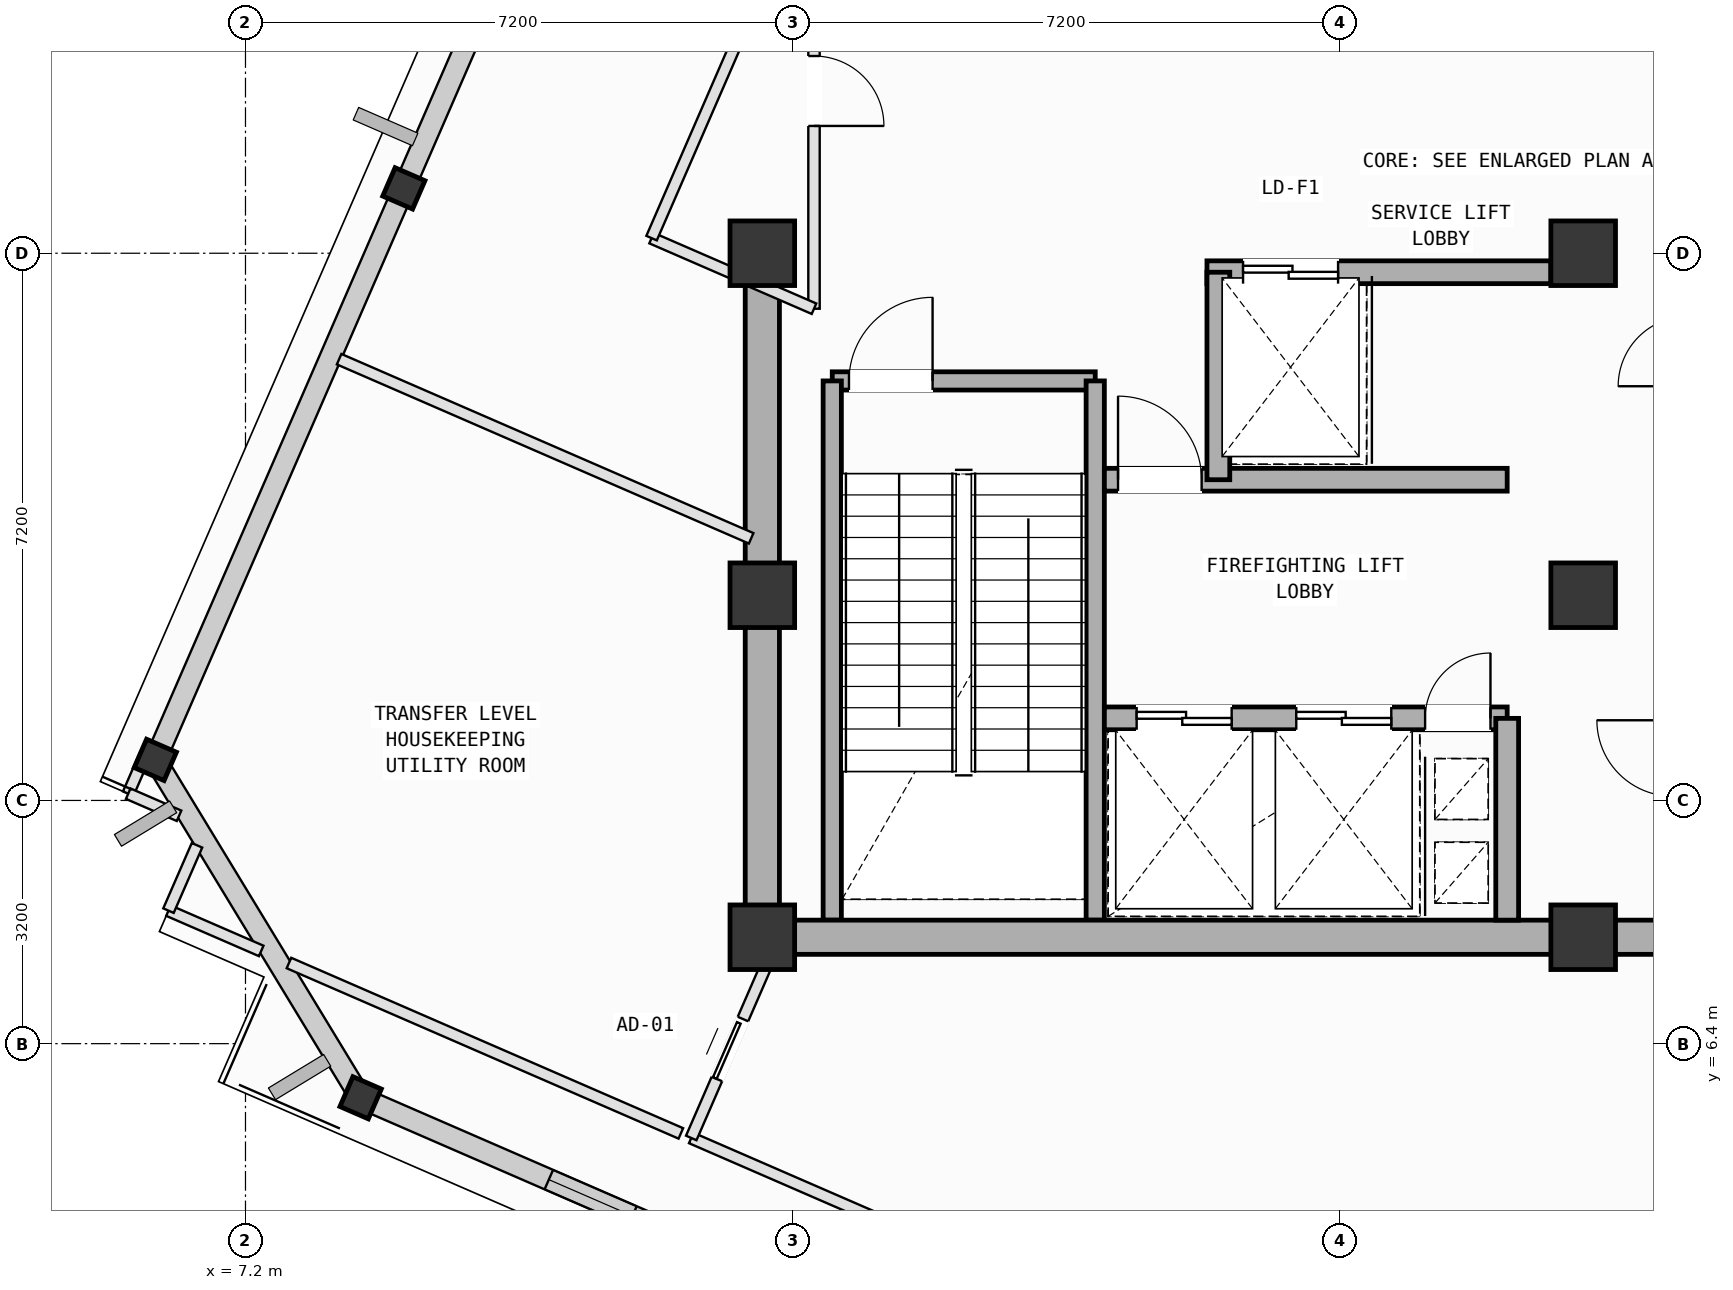
"""IFC4 building model, lengths in metres.
Left out: names, types, materials, properties, quantities, classifications, styles, units other than length and angle.
Written with IfcOpenShell. Run it as: python <this file> out.ifc"""

import sys

from ifc_helpers import new_model, si_unit, direction, frame, frame_2d, origin, origin_2d, place, context, subcontext, project, spatial, rectangle, i_section, extrude, element, fill, save


model = new_model("IFC4")
c1 = context("Model", 3, precision=1e-05, world=origin(), true_north=direction((0.0, 1.0)))
c2 = subcontext(c1, "Body", "Model", "MODEL_VIEW")
j1 = project(units=[si_unit("LENGTHUNIT", "METRE"), si_unit("PLANEANGLEUNIT", "RADIAN")], contexts=[c1])
p1 = place(None, origin())
s1 = spatial("IfcSite", under=j1, at=p1, CompositionType="ELEMENT")
p2 = place(p1, origin())
s2 = spatial("IfcBuilding", under=s1, at=p2, CompositionType="ELEMENT")
p3 = place(p2, frame((0.0, 0.0, 342.6)))
s3 = spatial("IfcBuildingStorey", under=s2, at=p3, CompositionType="ELEMENT", Elevation=342.6)
for number, where, z_axis, x_axis in (
    (1, (14.0, 7.8, 0.0), (0.0, 0.0, 1.0), (1.0, 0.0, 0.0)),
    (2, (14.0, 12.3, 0.0), (0.0, 0.0, 1.0), (1.0, 0.0, 0.0)),
    (3, (14.0, 16.8, 0.0), (0.0, 0.0, 1.0), (1.0, 0.0, 0.0)),
    (4, (24.8, 7.8, 0.0), (0.0, 0.0, 1.0), (1.0, 0.0, 0.0)),
    (5, (24.8, 12.3, 0.0), (0.0, 0.0, 1.0), (1.0, 0.0, 0.0)),
    (6, (24.8, 16.8, 0.0), (0.0, 0.0, 1.0), (1.0, 0.0, 0.0)),
):
    element("IfcColumn", number, at=place(p3, frame(where, z_axis=z_axis, x_axis=x_axis)), inside=s3, PredefinedType="COLUMN", context=c2, shape_type="SweptSolid", body=[
        extrude(rectangle(XDim=0.85, YDim=0.85, at=origin_2d()), origin(), (0.0, 0.0, 1.0), 5.2),
    ])
for number, where, z_axis, x_axis in (
    (7, (9.283, 17.654, 0.002), (0.0, 0.0, 1.0), (0.399, 0.917, 0.0)),
    (8, (6.014, 10.134, 0.002), (0.0, 0.0, 1.0), (0.399, 0.917, 0.0)),
    (9, (8.715, 5.688, 0.002), (0.0, 0.0, 1.0), (-0.917, 0.399, 0.0)),
):
    element("IfcColumn", number, at=place(p3, frame(where, z_axis=z_axis, x_axis=x_axis)), inside=s3, PredefinedType="COLUMN", context=c2, shape_type="SweptSolid", body=[
        extrude(i_section(OverallWidth=0.407, OverallDepth=0.428, WebThickness=0.02, FlangeThickness=0.035, FilletRadius=0.022, at=origin_2d()), origin(), (0.0, 0.0, 1.0), 5.196),
    ])
p4 = place(p3, frame((25.119, 21.345, 0.0), z_axis=(0.0, 0.0, 1.0), x_axis=(0.917063044715, -0.398742237565, 0.0)))
e10 = element("IfcWall", 10, at=p4, inside=s3, PredefinedType="SOLIDWALL", context=c2, shape_type="SweptSolid", body=[
    extrude(rectangle(XDim=7.75, YDim=0.28, at=frame_2d((3.875, 0.0))), origin(), (0.0, 0.0, 1.0), 3.835),
])
p5 = place(p3, frame((9.283, 17.653, 0.0), z_axis=(0.0, 0.0, 1.0), x_axis=(0.398746796056, 0.917061062653, 0.0)))
e11 = element("IfcWall", 11, at=p5, inside=s3, PredefinedType="SOLIDWALL", context=c2, shape_type="SweptSolid", body=[
    extrude(rectangle(XDim=8.2, YDim=0.28, at=frame_2d((4.1, 0.0))), origin(), (0.0, 0.0, 1.0), 4.335),
])
p6 = place(p3, frame((6.014, 10.134, 0.0), z_axis=(0.0, 0.0, 1.0), x_axis=(0.398732643684, 0.917067216108, 0.0)))
e12 = element("IfcWall", 12, at=p6, inside=s3, PredefinedType="SOLIDWALL", context=c2, shape_type="SweptSolid", body=[
    extrude(rectangle(XDim=8.2, YDim=0.28, at=frame_2d((4.1, 0.0))), origin(), (0.0, 0.0, 1.0), 4.335),
])
p7 = place(p3, frame((8.715, 5.688, 0.0), z_axis=(0.0, 0.0, 1.0), x_axis=(-0.519249986957, 0.854622402611, 0.0)))
e13 = element("IfcWall", 13, at=p7, inside=s3, PredefinedType="SOLIDWALL", context=c2, shape_type="SweptSolid", body=[
    extrude(rectangle(XDim=5.202, YDim=0.28, at=frame_2d((2.601, 0.0))), origin(), (0.0, 0.0, 1.0), 4.335),
])
p8 = place(p3, frame((14.768, 3.056, 0.0), z_axis=(0.0, 0.0, 1.0), x_axis=(-0.917052412425, 0.398766689764, 0.0)))
e14 = element("IfcWall", 14, at=p8, inside=s3, PredefinedType="SOLIDWALL", context=c2, shape_type="SweptSolid", body=[
    extrude(rectangle(XDim=6.6, YDim=0.28, at=frame_2d((3.3, 0.0))), origin(), (0.0, 0.0, 1.0), 4.335),
])
p9 = place(p8, frame((2.7, 0.0, 0.75)))
e15 = element("IfcOpeningElement", 15, at=p9, cuts=e14, PredefinedType="OPENING", context=c2, shape_type="SweptSolid", body=[
    extrude(rectangle(XDim=1.2, YDim=1.75, at=frame_2d((0.6, 0.875))), frame((0.0, 0.15, 0.0), z_axis=(0.0, -1.0, 0.0), x_axis=(1.0, 0.0, 0.0)), (0.0, 0.0, 1.0), 0.3),
])
p10 = place(p8, frame((0.678, 0.0, 0.75)))
e16 = element("IfcOpeningElement", 16, at=p10, cuts=e14, PredefinedType="OPENING", context=c2, shape_type="SweptSolid", body=[
    extrude(rectangle(XDim=1.2, YDim=1.75, at=frame_2d((0.6, 0.875))), frame((0.0, 0.15, 0.0), z_axis=(0.0, -1.0, 0.0), x_axis=(1.0, 0.0, 0.0)), (0.0, 0.0, 1.0), 0.3),
])
p11 = place(p3, frame((14.92, 15.12, 0.0), z_axis=(0.0, 0.0, 1.0), x_axis=(1.0, 0.0, 0.0)))
e17 = element("IfcWall", 17, at=p11, inside=s3, PredefinedType="SOLIDWALL", context=c2, shape_type="SweptSolid", body=[
    extrude(rectangle(XDim=3.46, YDim=0.24, at=frame_2d((1.73, 0.0))), origin(), (0.0, 0.0, 1.0), 4.85),
])
p12 = place(p11, frame((0.22, 0.0, 0.0)))
e18 = element("IfcOpeningElement", 18, at=p12, cuts=e17, PredefinedType="OPENING", context=c2, shape_type="SweptSolid", body=[
    extrude(rectangle(XDim=1.1, YDim=2.15, at=frame_2d((0.55, 1.075))), frame((0.0, 0.13, 0.0), z_axis=(0.0, -1.0, 0.0), x_axis=(1.0, 0.0, 0.0)), (0.0, 0.0, 1.0), 0.26),
])
for number, where, z_axis, x_axis in (
    (19, (18.38, 15.12, 0.0), (0.0, 0.0, 1.0), (0.0, -1.0, 0.0)),
    (20, (14.92, 8.025, 0.0), (0.0, 0.0, 1.0), (0.0, 1.0, 0.0)),
):
    element("IfcWall", number, at=place(p3, frame(where, z_axis=z_axis, x_axis=x_axis)), inside=s3, PredefinedType="SOLIDWALL", context=c2, shape_type="SweptSolid", body=[
        extrude(rectangle(XDim=7.095, YDim=0.24, at=frame_2d((3.548, 0.0))), origin(), (0.0, 0.0, 1.0), 4.85),
    ])
for number, where, z_axis, x_axis in (
    (21, (14.0, 7.8, 0.0), (0.0, 0.0, 1.0), (1.0, 0.0, 0.0)),
    (22, (24.8, 7.8, 0.0), (0.0, 0.0, 1.0), (1.0, 0.0, 0.0)),
):
    element("IfcWall", number, at=place(p3, frame(where, z_axis=z_axis, x_axis=x_axis)), inside=s3, PredefinedType="SHEAR", context=c2, shape_type="SweptSolid", body=[
        extrude(rectangle(XDim=10.8, YDim=0.45, at=frame_2d((5.4, 0.0))), origin(), (0.0, 0.0, 1.0), 4.85),
    ])
p13 = place(p3, frame((14.0, 16.8, 0.0), z_axis=(0.0, 0.0, 1.0), x_axis=(0.0, -1.0, 0.0)))
e23 = element("IfcWall", 23, at=p13, inside=s3, PredefinedType="SHEAR", context=c2, shape_type="SweptSolid", body=[
    extrude(rectangle(XDim=9.0, YDim=0.45, at=frame_2d((4.5, 0.0))), origin(), (0.0, 0.0, 1.0), 4.85),
])
p14 = place(p3, frame((19.85, 16.55, 0.0), z_axis=(0.0, 0.0, 1.0), x_axis=(1.0, 0.0, 0.0)))
e24 = element("IfcWall", 24, at=p14, inside=s3, PredefinedType="SOLIDWALL", context=c2, shape_type="SweptSolid", body=[
    extrude(rectangle(XDim=4.525, YDim=0.3, at=frame_2d((2.262, 0.0))), origin(), (0.0, 0.0, 1.0), 4.85),
])
p15 = place(p14, frame((0.475, 0.0, 0.0)))
e25 = element("IfcOpeningElement", 25, at=p15, cuts=e24, PredefinedType="OPENING", context=c2, shape_type="SweptSolid", body=[
    extrude(rectangle(XDim=1.25, YDim=2.18, at=frame_2d((0.625, 1.09))), frame((0.0, 0.16, 0.0), z_axis=(0.0, -1.0, 0.0), x_axis=(1.0, 0.0, 0.0)), (0.0, 0.0, 1.0), 0.32),
])
p16 = place(p3, frame((18.5, 10.68, 0.0), z_axis=(0.0, 0.0, 1.0), x_axis=(1.0, 0.0, 0.0)))
e26 = element("IfcWall", 26, at=p16, inside=s3, PredefinedType="SOLIDWALL", context=c2, shape_type="SweptSolid", body=[
    extrude(rectangle(XDim=5.3, YDim=0.3, at=frame_2d((2.65, 0.0))), origin(), (0.0, 0.0, 1.0), 4.85),
])
p17 = place(p16, frame((4.22, 0.0, 0.0)))
e27 = element("IfcOpeningElement", 27, at=p17, cuts=e26, PredefinedType="OPENING", context=c2, shape_type="SweptSolid", body=[
    extrude(rectangle(XDim=0.86, YDim=2.06, at=frame_2d((0.43, 1.03))), frame((0.0, 0.16, 0.0), z_axis=(0.0, -1.0, 0.0), x_axis=(1.0, 0.0, 0.0)), (0.0, 0.0, 1.0), 0.32),
])
p18 = place(p16, frame((0.425, 0.0, 0.0)))
e28 = element("IfcOpeningElement", 28, at=p18, cuts=e26, PredefinedType="OPENING", context=c2, shape_type="SweptSolid", body=[
    extrude(rectangle(XDim=1.25, YDim=2.18, at=frame_2d((0.625, 1.09))), frame((0.0, 0.16, 0.0), z_axis=(0.0, -1.0, 0.0), x_axis=(1.0, 0.0, 0.0)), (0.0, 0.0, 1.0), 0.32),
])
p19 = place(p16, frame((2.525, 0.0, 0.0)))
e29 = element("IfcOpeningElement", 29, at=p19, cuts=e26, PredefinedType="OPENING", context=c2, shape_type="SweptSolid", body=[
    extrude(rectangle(XDim=1.25, YDim=2.18, at=frame_2d((0.625, 1.09))), frame((0.0, 0.16, 0.0), z_axis=(0.0, -1.0, 0.0), x_axis=(1.0, 0.0, 0.0)), (0.0, 0.0, 1.0), 0.32),
])
p20 = place(p3, frame((18.5, 13.82, 0.0), z_axis=(0.0, 0.0, 1.0), x_axis=(1.0, 0.0, 0.0)))
e30 = element("IfcWall", 30, at=p20, inside=s3, PredefinedType="SOLIDWALL", context=c2, shape_type="SweptSolid", body=[
    extrude(rectangle(XDim=5.3, YDim=0.3, at=frame_2d((2.65, 0.0))), origin(), (0.0, 0.0, 1.0), 4.85),
])
p21 = place(p20, frame((0.18, 0.0, 0.0)))
e31 = element("IfcOpeningElement", 31, at=p21, cuts=e30, PredefinedType="OPENING", context=c2, shape_type="SweptSolid", body=[
    extrude(rectangle(XDim=1.1, YDim=2.15, at=frame_2d((0.55, 1.075))), frame((0.0, 0.16, 0.0), z_axis=(0.0, -1.0, 0.0), x_axis=(1.0, 0.0, 0.0)), (0.0, 0.0, 1.0), 0.32),
])
p22 = place(p3, frame((23.8, 8.025, 0.0), z_axis=(0.0, 0.0, 1.0), x_axis=(0.0, 1.0, 0.0)))
e32 = element("IfcWall", 32, at=p22, inside=s3, PredefinedType="SOLIDWALL", context=c2, shape_type="SweptSolid", body=[
    extrude(rectangle(XDim=2.655, YDim=0.3, at=frame_2d((1.328, 0.0))), origin(), (0.0, 0.0, 1.0), 4.85),
])
p23 = place(p3, frame((20.0, 13.82, 0.0), z_axis=(0.0, 0.0, 1.0), x_axis=(0.0, 1.0, 0.0)))
e33 = element("IfcWall", 33, at=p23, inside=s3, PredefinedType="SOLIDWALL", context=c2, shape_type="SweptSolid", body=[
    extrude(rectangle(XDim=2.73, YDim=0.3, at=frame_2d((1.365, 0.0))), origin(), (0.0, 0.0, 1.0), 4.85),
])
p24 = place(p3, frame((32.323, -3.214, 0.0), z_axis=(0.0, 0.0, 1.0), x_axis=(-0.917070425919, 0.398725261182, 0.0)))
e34 = element("IfcWall", 34, at=p24, inside=s3, PredefinedType="PARTITIONING", context=c2, shape_type="SweptSolid", body=[
    extrude(rectangle(XDim=21.0, YDim=0.15, at=frame_2d((10.5, 0.0))), origin(), (0.0, 0.0, 1.0), 4.85),
])
p25 = place(p3, frame((13.065, 5.159, 0.0), z_axis=(0.0, 0.0, 1.0), x_axis=(0.398796049667, 0.917039645146, 0.0)))
e35 = element("IfcWall", 35, at=p25, inside=s3, PredefinedType="PARTITIONING", context=c2, shape_type="SweptSolid", body=[
    extrude(rectangle(XDim=2.553, YDim=0.15, at=frame_2d((1.276, 0.0))), origin(), (0.0, 0.0, 1.0), 4.85),
])
p26 = place(p25, frame((0.846, 0.0, 0.0)))
e36 = element("IfcOpeningElement", 36, at=p26, cuts=e35, PredefinedType="OPENING", context=c2, shape_type="SweptSolid", body=[
    extrude(rectangle(XDim=0.86, YDim=2.06, at=frame_2d((0.43, 1.03))), frame((0.0, 0.085, 0.0), z_axis=(0.0, -1.0, 0.0), x_axis=(1.0, 0.0, 0.0)), (0.0, 0.0, 1.0), 0.17),
])
p27 = place(p3, frame((5.657, 9.689, 0.0), z_axis=(0.0, 0.0, 1.0), x_axis=(0.398417502459, 0.917204172327, 0.0)))
e37 = element("IfcWall", 37, at=p27, inside=s3, PredefinedType="PARTITIONING", context=c2, shape_type="SweptSolid", body=[
    extrude(rectangle(XDim=0.55, YDim=0.15, at=frame_2d((0.275, 0.0))), origin(), (0.0, 0.0, 1.0), 4.335),
])
p28 = place(p3, frame((8.432, 15.406, 0.0), z_axis=(0.0, 0.0, 1.0), x_axis=(0.917075309006, -0.398714029865, 0.0)))
e38 = element("IfcWall", 38, at=p28, inside=s3, PredefinedType="PARTITIONING", context=c2, shape_type="SweptSolid", body=[
    extrude(rectangle(XDim=5.911, YDim=0.15, at=frame_2d((2.956, 0.0))), origin(), (0.0, 0.0, 1.0), 4.85),
])
p29 = place(p3, frame((12.928, 5.219, 0.0), z_axis=(0.0, 0.0, 1.0), x_axis=(-0.917056939017, 0.3987562797, 0.0)))
e39 = element("IfcWall", 39, at=p29, inside=s3, PredefinedType="PARTITIONING", context=c2, shape_type="SweptSolid", body=[
    extrude(rectangle(XDim=5.622, YDim=0.15, at=frame_2d((2.811, 0.0))), origin(), (0.0, 0.0, 1.0), 4.85),
])
p30 = place(p3, frame((7.407, 7.62, 0.0), z_axis=(0.0, 0.0, 1.0), x_axis=(-0.917245063995, 0.398323351785, 0.0)))
e40 = element("IfcWall", 40, at=p30, inside=s3, PredefinedType="PARTITIONING", context=c2, shape_type="SweptSolid", body=[
    extrude(rectangle(XDim=1.33, YDim=0.15, at=frame_2d((0.665, 0.0))), origin(), (0.0, 0.0, 1.0), 4.85),
])
p31 = place(p3, frame((6.187, 8.15, 0.0), z_axis=(0.0, 0.0, 1.0), x_axis=(0.39965830238, 0.916664192242, 0.0)))
e41 = element("IfcWall", 41, at=p31, inside=s3, PredefinedType="PARTITIONING", context=c2, shape_type="SweptSolid", body=[
    extrude(rectangle(XDim=0.938, YDim=0.15, at=frame_2d((0.469, 0.0))), origin(), (0.0, 0.0, 1.0), 4.85),
])
p32 = place(p3, frame((6.326, 9.398, 0.0), z_axis=(0.0, 0.0, 1.0), x_axis=(-0.916984905679, 0.398921900573, 0.0)))
e42 = element("IfcWall", 42, at=p32, inside=s3, PredefinedType="PARTITIONING", context=c2, shape_type="SweptSolid", body=[
    extrude(rectangle(XDim=0.729, YDim=0.15, at=frame_2d((0.365, 0.0))), origin(), (0.0, 0.0, 1.0), 4.85),
])
p33 = place(p3, frame((14.68, 21.8, 0.0), z_axis=(0.0, 0.0, 1.0), x_axis=(0.0, -1.0, 0.0)))
e43 = element("IfcWall", 43, at=p33, inside=s3, PredefinedType="PARTITIONING", context=c2, shape_type="SweptSolid", body=[
    extrude(rectangle(XDim=5.73, YDim=0.15, at=frame_2d((2.865, 0.0))), origin(), (0.0, 0.0, 1.0), 4.85),
])
p34 = place(p33, frame((2.405, 0.0, 0.0)))
e44 = element("IfcOpeningElement", 44, at=p34, cuts=e43, PredefinedType="OPENING", context=c2, shape_type="SweptSolid", body=[
    extrude(rectangle(XDim=0.92, YDim=2.1, at=frame_2d((0.46, 1.05))), frame((0.0, 0.085, 0.0), z_axis=(0.0, -1.0, 0.0), x_axis=(1.0, 0.0, 0.0)), (0.0, 0.0, 1.0), 0.17),
])
p35 = place(p3, frame((14.68, 16.07, 0.0), z_axis=(0.0, 0.0, 1.0), x_axis=(-0.917095040527, 0.39866864266, 0.0)))
e45 = element("IfcWall", 45, at=p35, inside=s3, PredefinedType="PARTITIONING", context=c2, shape_type="SweptSolid", body=[
    extrude(rectangle(XDim=2.33, YDim=0.15, at=frame_2d((1.165, 0.0))), origin(), (0.0, 0.0, 1.0), 3.835),
])
p36 = place(p3, frame((12.543, 16.999, 0.0), z_axis=(0.0, 0.0, 1.0), x_axis=(0.398719902043, 0.917072755955, 0.0)))
e46 = element("IfcWall", 46, at=p36, inside=s3, PredefinedType="PARTITIONING", context=c2, shape_type="SweptSolid", body=[
    extrude(rectangle(XDim=5.751, YDim=0.15, at=frame_2d((2.875, 0.0))), origin(), (0.0, 0.0, 1.0), 4.85),
])
p37 = place(p9, origin())
e47 = element("IfcWindow", 47, at=p37, inside=s3, PartitioningType="SINGLE_PANEL", PredefinedType="WINDOW", context=c2, shape_type="SweptSolid", body=[
    extrude(rectangle(XDim=1.2, YDim=1.75, at=frame_2d((0.6, 0.875))), frame((0.0, 0.03, 0.0), z_axis=(0.0, -1.0, 0.0), x_axis=(1.0, 0.0, 0.0)), (0.0, 0.0, 1.0), 0.06),
])
fill(e15, e47)
p38 = place(p12, origin())
e48 = element("IfcDoor", 48, at=p38, inside=s3, OperationType="SINGLE_SWING_RIGHT", PredefinedType="DOOR", context=c2, shape_type="SweptSolid", body=[
    extrude(rectangle(XDim=1.1, YDim=2.15, at=frame_2d((0.55, 1.075))), frame((0.0, 0.025, 0.0), z_axis=(0.0, -1.0, 0.0), x_axis=(1.0, 0.0, 0.0)), (0.0, 0.0, 1.0), 0.05),
])
fill(e18, e48)
p39 = place(p17, origin())
e49 = element("IfcDoor", 49, at=p39, inside=s3, OperationType="SINGLE_SWING_RIGHT", PredefinedType="DOOR", context=c2, shape_type="SweptSolid", body=[
    extrude(rectangle(XDim=0.86, YDim=2.06, at=frame_2d((0.43, 1.03))), frame((0.0, 0.025, 0.0), z_axis=(0.0, -1.0, 0.0), x_axis=(1.0, 0.0, 0.0)), (0.0, 0.0, 1.0), 0.05),
])
fill(e27, e49)
p40 = place(p21, origin())
e50 = element("IfcDoor", 50, at=p40, inside=s3, OperationType="SINGLE_SWING_LEFT", PredefinedType="DOOR", context=c2, shape_type="SweptSolid", body=[
    extrude(rectangle(XDim=1.1, YDim=2.15, at=frame_2d((0.55, 1.075))), frame((0.0, 0.025, 0.0), z_axis=(0.0, -1.0, 0.0), x_axis=(1.0, 0.0, 0.0)), (0.0, 0.0, 1.0), 0.05),
])
fill(e31, e50)
p41 = place(p18, origin())
e51 = element("IfcDoor", 51, at=p41, inside=s3, OperationType="DOUBLE_DOOR_SLIDING", PredefinedType="DOOR", context=c2, shape_type="SweptSolid", body=[
    extrude(rectangle(XDim=1.25, YDim=2.18, at=frame_2d((0.625, 1.09))), frame((0.0, 0.025, 0.0), z_axis=(0.0, -1.0, 0.0), x_axis=(1.0, 0.0, 0.0)), (0.0, 0.0, 1.0), 0.05),
])
fill(e28, e51)
p42 = place(p19, origin())
e52 = element("IfcDoor", 52, at=p42, inside=s3, OperationType="DOUBLE_DOOR_SLIDING", PredefinedType="DOOR", context=c2, shape_type="SweptSolid", body=[
    extrude(rectangle(XDim=1.25, YDim=2.18, at=frame_2d((0.625, 1.09))), frame((0.0, 0.025, 0.0), z_axis=(0.0, -1.0, 0.0), x_axis=(1.0, 0.0, 0.0)), (0.0, 0.0, 1.0), 0.05),
])
fill(e29, e52)
p43 = place(p15, origin())
e53 = element("IfcDoor", 53, at=p43, inside=s3, OperationType="DOUBLE_DOOR_SLIDING", PredefinedType="DOOR", context=c2, shape_type="SweptSolid", body=[
    extrude(rectangle(XDim=1.25, YDim=2.18, at=frame_2d((0.625, 1.09))), frame((0.0, 0.025, 0.0), z_axis=(0.0, -1.0, 0.0), x_axis=(1.0, 0.0, 0.0)), (0.0, 0.0, 1.0), 0.05),
])
fill(e25, e53)
p44 = place(p34, origin())
e54 = element("IfcDoor", 54, at=p44, inside=s3, OperationType="SINGLE_SWING_RIGHT", PredefinedType="DOOR", context=c2, shape_type="SweptSolid", body=[
    extrude(rectangle(XDim=0.92, YDim=2.1, at=frame_2d((0.46, 1.05))), frame((0.0, 0.025, 0.0), z_axis=(0.0, -1.0, 0.0), x_axis=(1.0, 0.0, 0.0)), (0.0, 0.0, 1.0), 0.05),
])
fill(e44, e54)
p45 = place(p26, origin())
e55 = element("IfcDoor", 55, at=p45, inside=s3, OperationType="SLIDING_TO_LEFT", PredefinedType="DOOR", context=c2, shape_type="SweptSolid", body=[
    extrude(rectangle(XDim=0.86, YDim=2.06, at=frame_2d((0.43, 1.03))), frame((0.0, 0.025, 0.0), z_axis=(0.0, -1.0, 0.0), x_axis=(1.0, 0.0, 0.0)), (0.0, 0.0, 1.0), 0.05),
])
fill(e36, e55)
save(model, sys.argv[1])
